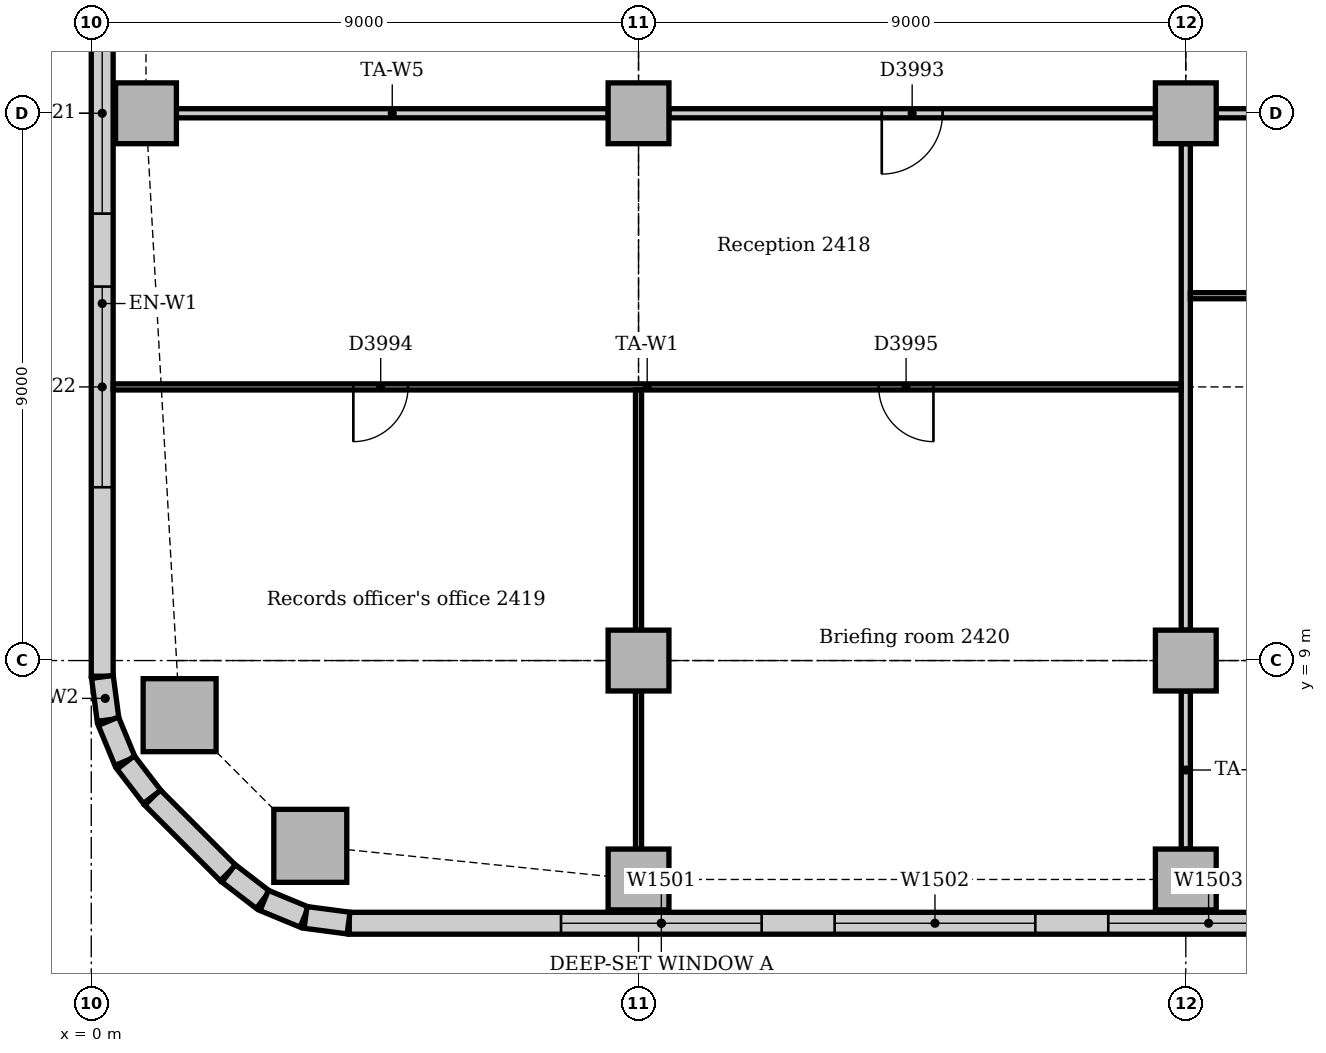
"""IFC4 building model, lengths in metres.
Left out: names, types, materials, properties, quantities, classifications, styles, units other than length and angle.
Written with IfcOpenShell. Run it as: python <this file> out.ifc"""

import sys

from ifc_helpers import new_model, si_unit, direction, frame, frame_2d, origin, origin_2d, place, context, subcontext, project, spatial, rectangle, extrude, element, fill, save


model = new_model("IFC4")
c1 = context("Model", 3, precision=1e-05, world=origin(), true_north=direction((0.0, 1.0)))
c2 = subcontext(c1, "Body", "Model", "MODEL_VIEW")
j1 = project(units=[si_unit("LENGTHUNIT", "METRE"), si_unit("PLANEANGLEUNIT", "RADIAN")], contexts=[c1])
p1 = place(None, origin())
s1 = spatial("IfcSite", under=j1, at=p1, CompositionType="ELEMENT")
p2 = place(p1, origin())
s2 = spatial("IfcBuilding", under=s1, at=p2, CompositionType="ELEMENT")
p3 = place(p2, frame((0.0, 0.0, 104.0)))
s3 = spatial("IfcBuildingStorey", under=s2, at=p3, CompositionType="ELEMENT", Elevation=104.0)
for number, where, z_axis, x_axis in (
    (1, (3.602, 5.953, 0.0), (0.0, 0.0, 1.0), (1.0, 0.0, 0.0)),
    (2, (1.453, 8.102, 0.0), (0.0, 0.0, 1.0), (1.0, 0.0, 0.0)),
):
    element("IfcColumn", number, at=place(p3, frame(where, z_axis=z_axis, x_axis=x_axis)), inside=s3, PredefinedType="COLUMN", context=c2, shape_type="SweptSolid", body=[
        extrude(rectangle(XDim=1.2, YDim=1.2, at=origin_2d()), origin(), (0.0, 0.0, 1.0), 3.85),
    ])
for number, where, z_axis, x_axis in (
    (3, (9.0, 5.4, 0.0), (0.0, 0.0, 1.0), (1.0, 0.0, 0.0)),
    (4, (18.0, 5.4, 0.0), (0.0, 0.0, 1.0), (1.0, 0.0, 0.0)),
    (5, (0.9, 18.0, 0.0), (0.0, 0.0, 1.0), (1.0, 0.0, 0.0)),
    (6, (9.0, 9.0, 0.0), (0.0, 0.0, 1.0), (1.0, 0.0, 0.0)),
    (7, (9.0, 18.0, 0.0), (0.0, 0.0, 1.0), (1.0, 0.0, 0.0)),
    (8, (18.0, 9.0, 0.0), (0.0, 0.0, 1.0), (1.0, 0.0, 0.0)),
    (9, (18.0, 18.0, 0.0), (0.0, 0.0, 1.0), (1.0, 0.0, 0.0)),
):
    element("IfcColumn", number, at=place(p3, frame(where, z_axis=z_axis, x_axis=x_axis)), inside=s3, PredefinedType="COLUMN", context=c2, shape_type="SweptSolid", body=[
        extrude(rectangle(XDim=1.0, YDim=1.0, at=origin_2d()), origin(), (0.0, 0.0, 1.0), 3.85),
    ])
p4 = place(p3, frame((4.243, 4.68, 0.0), z_axis=(0.0, 0.0, 1.0), x_axis=(1.0, 0.0, 0.0)))
e10 = element("IfcWall", 10, at=p4, inside=s3, PredefinedType="STANDARD", context=c2, shape_type="SweptSolid", body=[
    extrude(rectangle(XDim=37.265, YDim=0.36, at=frame_2d((18.632, 0.0))), origin(), (0.0, 0.0, 1.0), 3.85),
])
p5 = place(p4, frame((3.482, 0.0, 0.9)))
e11 = element("IfcOpeningElement", 11, at=p5, cuts=e10, PredefinedType="OPENING", context=c2, shape_type="SweptSolid", body=[
    extrude(rectangle(XDim=3.3, YDim=1.6, at=frame_2d((1.65, 0.8))), frame((0.0, 0.19, 0.0), z_axis=(0.0, -1.0, 0.0), x_axis=(1.0, 0.0, 0.0)), (0.0, 0.0, 1.0), 0.38),
])
p6 = place(p4, frame((7.982, 0.0, 0.9)))
e12 = element("IfcOpeningElement", 12, at=p6, cuts=e10, PredefinedType="OPENING", context=c2, shape_type="SweptSolid", body=[
    extrude(rectangle(XDim=3.3, YDim=1.6, at=frame_2d((1.65, 0.8))), frame((0.0, 0.19, 0.0), z_axis=(0.0, -1.0, 0.0), x_axis=(1.0, 0.0, 0.0)), (0.0, 0.0, 1.0), 0.38),
])
p7 = place(p4, frame((12.482, 0.0, 0.9)))
e13 = element("IfcOpeningElement", 13, at=p7, cuts=e10, PredefinedType="OPENING", context=c2, shape_type="SweptSolid", body=[
    extrude(rectangle(XDim=3.3, YDim=1.6, at=frame_2d((1.65, 0.8))), frame((0.0, 0.19, 0.0), z_axis=(0.0, -1.0, 0.0), x_axis=(1.0, 0.0, 0.0)), (0.0, 0.0, 1.0), 0.38),
])
p8 = place(p4, frame((16.982, 0.0, 0.9)))
e14 = element("IfcOpeningElement", 14, at=p8, cuts=e10, PredefinedType="OPENING", context=c2, shape_type="SweptSolid", body=[
    extrude(rectangle(XDim=3.3, YDim=1.6, at=frame_2d((1.65, 0.8))), frame((0.0, 0.19, 0.0), z_axis=(0.0, -1.0, 0.0), x_axis=(1.0, 0.0, 0.0)), (0.0, 0.0, 1.0), 0.38),
])
p9 = place(p4, frame((21.482, 0.0, 0.9)))
e15 = element("IfcOpeningElement", 15, at=p9, cuts=e10, PredefinedType="OPENING", context=c2, shape_type="SweptSolid", body=[
    extrude(rectangle(XDim=3.3, YDim=1.6, at=frame_2d((1.65, 0.8))), frame((0.0, 0.19, 0.0), z_axis=(0.0, -1.0, 0.0), x_axis=(1.0, 0.0, 0.0)), (0.0, 0.0, 1.0), 0.38),
])
p10 = place(p4, frame((27.482, 0.0, 0.9)))
e16 = element("IfcOpeningElement", 16, at=p10, cuts=e10, PredefinedType="OPENING", context=c2, shape_type="SweptSolid", body=[
    extrude(rectangle(XDim=1.8, YDim=1.6, at=frame_2d((0.9, 0.8))), frame((0.0, 0.19, 0.0), z_axis=(0.0, -1.0, 0.0), x_axis=(1.0, 0.0, 0.0)), (0.0, 0.0, 1.0), 0.38),
])
p11 = place(p4, frame((30.482, 0.0, 0.9)))
e17 = element("IfcOpeningElement", 17, at=p11, cuts=e10, PredefinedType="OPENING", context=c2, shape_type="SweptSolid", body=[
    extrude(rectangle(XDim=3.3, YDim=1.6, at=frame_2d((1.65, 0.8))), frame((0.0, 0.19, 0.0), z_axis=(0.0, -1.0, 0.0), x_axis=(1.0, 0.0, 0.0)), (0.0, 0.0, 1.0), 0.38),
])
p12 = place(p3, frame((0.18, 21.0, 0.0), z_axis=(0.0, 0.0, 1.0), x_axis=(0.0, -1.0, 0.0)))
e18 = element("IfcWall", 18, at=p12, inside=s3, PredefinedType="STANDARD", context=c2, shape_type="SweptSolid", body=[
    extrude(rectangle(XDim=12.257, YDim=0.36, at=frame_2d((6.129, 0.0))), origin(), (0.0, 0.0, 1.0), 3.85),
])
p13 = place(p12, frame((1.35, 0.0, 0.9)))
e19 = element("IfcOpeningElement", 19, at=p13, cuts=e18, PredefinedType="OPENING", context=c2, shape_type="SweptSolid", body=[
    extrude(rectangle(XDim=3.3, YDim=1.6, at=frame_2d((1.65, 0.8))), frame((0.0, 0.19, 0.0), z_axis=(0.0, -1.0, 0.0), x_axis=(1.0, 0.0, 0.0)), (0.0, 0.0, 1.0), 0.38),
])
p14 = place(p12, frame((5.85, 0.0, 0.9)))
e20 = element("IfcOpeningElement", 20, at=p14, cuts=e18, PredefinedType="OPENING", context=c2, shape_type="SweptSolid", body=[
    extrude(rectangle(XDim=3.3, YDim=1.6, at=frame_2d((1.65, 0.8))), frame((0.0, 0.19, 0.0), z_axis=(0.0, -1.0, 0.0), x_axis=(1.0, 0.0, 0.0)), (0.0, 0.0, 1.0), 0.38),
])
p15 = place(p3, frame((1.006, 6.749, 0.0), z_axis=(0.0, 0.0, 1.0), x_axis=(0.707106781187, -0.707106781187, 0.0)))
e21 = element("IfcWall", 21, at=p15, inside=s3, PredefinedType="STANDARD", context=c2, shape_type="SweptSolid", body=[
    extrude(rectangle(XDim=1.757, YDim=0.36, at=frame_2d((0.879, 0.0))), origin(), (0.0, 0.0, 1.0), 3.85),
])
for number, where, z_axis, x_axis in (
    (22, (0.183, 8.731, 0.0), (0.0, 0.0, 1.0), (0.131, -0.991, 0.0)),
    (23, (0.282, 8.003, 0.0), (0.0, 0.0, 1.0), (0.383, -0.924, 0.0)),
):
    element("IfcWall", number, at=place(p3, frame(where, z_axis=z_axis, x_axis=x_axis)), inside=s3, PredefinedType="STANDARD", context=c2, shape_type="SweptSolid", body=[
        extrude(rectangle(XDim=0.713, YDim=0.36, at=frame_2d((0.356, 0.0))), origin(), (0.0, 0.0, 1.0), 3.85),
    ])
for number, where, z_axis, x_axis in (
    (24, (0.566, 7.324, 0.0), (0.0, 0.0, 1.0), (0.609, -0.793, 0.0)),
    (25, (2.259, 5.5, 0.0), (0.0, 0.0, 1.0), (0.793, -0.609, 0.0)),
):
    element("IfcWall", number, at=place(p3, frame(where, z_axis=z_axis, x_axis=x_axis)), inside=s3, PredefinedType="STANDARD", context=c2, shape_type="SweptSolid", body=[
        extrude(rectangle(XDim=0.713, YDim=0.36, at=frame_2d((0.357, 0.0))), origin(), (0.0, 0.0, 1.0), 3.85),
    ])
for number, where, z_axis, x_axis in (
    (26, (2.844, 5.055, 0.0), (0.0, 0.0, 1.0), (0.924, -0.383, 0.0)),
    (27, (3.524, 4.776, 0.0), (0.0, 0.0, 1.0), (0.991, -0.131, 0.0)),
):
    element("IfcWall", number, at=place(p3, frame(where, z_axis=z_axis, x_axis=x_axis)), inside=s3, PredefinedType="STANDARD", context=c2, shape_type="SweptSolid", body=[
        extrude(rectangle(XDim=0.713, YDim=0.36, at=frame_2d((0.356, 0.0))), origin(), (0.0, 0.0, 1.0), 3.85),
    ])
p16 = place(p3, frame((18.5, 18.0, 0.0), z_axis=(0.0, 0.0, 1.0), x_axis=(1.0, 0.0, 0.0)))
e28 = element("IfcWall", 28, at=p16, inside=s3, PredefinedType="PARTITIONING", context=c2, shape_type="SweptSolid", body=[
    extrude(rectangle(XDim=8.0, YDim=0.15, at=frame_2d((4.0, 0.0))), origin(), (0.0, 0.0, 1.0), 3.158),
])
p17 = place(p16, frame((3.5, 0.0, 0.0)))
e29 = element("IfcOpeningElement", 29, at=p17, cuts=e28, PredefinedType="OPENING", context=c2, shape_type="SweptSolid", body=[
    extrude(rectangle(XDim=1.0, YDim=2.1, at=frame_2d((0.5, 1.05))), frame((0.0, 0.085, 0.0), z_axis=(0.0, -1.0, 0.0), x_axis=(1.0, 0.0, 0.0)), (0.0, 0.0, 1.0), 0.17),
])
p18 = place(p3, frame((9.5, 18.0, 0.0), z_axis=(0.0, 0.0, 1.0), x_axis=(1.0, 0.0, 0.0)))
e30 = element("IfcWall", 30, at=p18, inside=s3, PredefinedType="PARTITIONING", context=c2, shape_type="SweptSolid", body=[
    extrude(rectangle(XDim=8.0, YDim=0.15, at=frame_2d((4.0, 0.0))), origin(), (0.0, 0.0, 1.0), 3.158),
])
p19 = place(p18, frame((3.5, 0.0, 0.0)))
e31 = element("IfcOpeningElement", 31, at=p19, cuts=e30, PredefinedType="OPENING", context=c2, shape_type="SweptSolid", body=[
    extrude(rectangle(XDim=1.0, YDim=2.1, at=frame_2d((0.5, 1.05))), frame((0.0, 0.085, 0.0), z_axis=(0.0, -1.0, 0.0), x_axis=(1.0, 0.0, 0.0)), (0.0, 0.0, 1.0), 0.17),
])
p20 = place(p3, frame((1.4, 18.0, 0.0), z_axis=(0.0, 0.0, 1.0), x_axis=(1.0, 0.0, 0.0)))
e32 = element("IfcWall", 32, at=p20, inside=s3, PredefinedType="PARTITIONING", context=c2, shape_type="SweptSolid", body=[
    extrude(rectangle(XDim=7.1, YDim=0.15, at=frame_2d((3.55, 0.0))), origin(), (0.0, 0.0, 1.0), 3.158),
])
p21 = place(p3, frame((18.0, 5.9, 0.0), z_axis=(0.0, 0.0, 1.0), x_axis=(0.0, 1.0, 0.0)))
e33 = element("IfcWall", 33, at=p21, inside=s3, PredefinedType="PARTITIONING", context=c2, shape_type="SweptSolid", body=[
    extrude(rectangle(XDim=2.6, YDim=0.15, at=frame_2d((1.3, 0.0))), origin(), (0.0, 0.0, 1.0), 3.652),
])
p22 = place(p3, frame((18.0, 9.5, 0.0), z_axis=(0.0, 0.0, 1.0), x_axis=(0.0, 1.0, 0.0)))
e34 = element("IfcWall", 34, at=p22, inside=s3, PredefinedType="PARTITIONING", context=c2, shape_type="SweptSolid", body=[
    extrude(rectangle(XDim=8.0, YDim=0.15, at=frame_2d((4.0, 0.0))), origin(), (0.0, 0.0, 1.0), 3.256),
])
p23 = place(p3, frame((0.36, 13.5, 0.0), z_axis=(0.0, 0.0, 1.0), x_axis=(1.0, 0.0, 0.0)))
e35 = element("IfcWall", 35, at=p23, inside=s3, PredefinedType="PARTITIONING", context=c2, shape_type="SweptSolid", body=[
    extrude(rectangle(XDim=17.565, YDim=0.1, at=frame_2d((8.783, 0.0))), origin(), (0.0, 0.0, 1.0), 3.354),
])
p24 = place(p23, frame((3.95, 0.0, 0.0)))
e36 = element("IfcOpeningElement", 36, at=p24, cuts=e35, PredefinedType="OPENING", context=c2, shape_type="SweptSolid", body=[
    extrude(rectangle(XDim=0.9, YDim=2.1, at=frame_2d((0.45, 1.05))), frame((0.0, 0.06, 0.0), z_axis=(0.0, -1.0, 0.0), x_axis=(1.0, 0.0, 0.0)), (0.0, 0.0, 1.0), 0.12),
])
p25 = place(p23, frame((12.59, 0.0, 0.0)))
e37 = element("IfcOpeningElement", 37, at=p25, cuts=e35, PredefinedType="OPENING", context=c2, shape_type="SweptSolid", body=[
    extrude(rectangle(XDim=0.9, YDim=2.1, at=frame_2d((0.45, 1.05))), frame((0.0, 0.06, 0.0), z_axis=(0.0, -1.0, 0.0), x_axis=(1.0, 0.0, 0.0)), (0.0, 0.0, 1.0), 0.12),
])
p26 = place(p3, frame((18.075, 15.0, 0.0), z_axis=(0.0, 0.0, 1.0), x_axis=(1.0, 0.0, 0.0)))
e38 = element("IfcWall", 38, at=p26, inside=s3, PredefinedType="PARTITIONING", context=c2, shape_type="SweptSolid", body=[
    extrude(rectangle(XDim=13.35, YDim=0.1, at=frame_2d((6.675, 0.0))), origin(), (0.0, 0.0, 1.0), 3.85),
])
p27 = place(p26, frame((6.2, 0.0, 0.0)))
e39 = element("IfcOpeningElement", 39, at=p27, cuts=e38, PredefinedType="OPENING", context=c2, shape_type="SweptSolid", body=[
    extrude(rectangle(XDim=0.9, YDim=2.1, at=frame_2d((0.45, 1.05))), frame((0.0, 0.06, 0.0), z_axis=(0.0, -1.0, 0.0), x_axis=(1.0, 0.0, 0.0)), (0.0, 0.0, 1.0), 0.12),
])
p28 = place(p3, frame((9.0, 5.9, 0.0), z_axis=(0.0, 0.0, 1.0), x_axis=(0.0, 1.0, 0.0)))
e40 = element("IfcWall", 40, at=p28, inside=s3, PredefinedType="PARTITIONING", context=c2, shape_type="SweptSolid", body=[
    extrude(rectangle(XDim=2.6, YDim=0.1, at=frame_2d((1.3, 0.0))), origin(), (0.0, 0.0, 1.0), 3.652),
])
p29 = place(p3, frame((9.0, 9.5, 0.0), z_axis=(0.0, 0.0, 1.0), x_axis=(0.0, 1.0, 0.0)))
e41 = element("IfcWall", 41, at=p29, inside=s3, PredefinedType="PARTITIONING", context=c2, shape_type="SweptSolid", body=[
    extrude(rectangle(XDim=3.95, YDim=0.1, at=frame_2d((1.975, 0.0))), origin(), (0.0, 0.0, 1.0), 3.256),
])
p30 = place(p5, origin())
e42 = element("IfcWindow", 42, at=p30, inside=s3, PartitioningType="SINGLE_PANEL", PredefinedType="WINDOW", context=c2, shape_type="SweptSolid", body=[
    extrude(rectangle(XDim=3.3, YDim=1.6, at=frame_2d((1.65, 0.8))), frame((0.0, 0.13, 0.0), z_axis=(0.0, -1.0, 0.0), x_axis=(1.0, 0.0, 0.0)), (0.0, 0.0, 1.0), 0.06),
])
fill(e11, e42)
p31 = place(p6, origin())
e43 = element("IfcWindow", 43, at=p31, inside=s3, PartitioningType="SINGLE_PANEL", PredefinedType="WINDOW", context=c2, shape_type="SweptSolid", body=[
    extrude(rectangle(XDim=3.3, YDim=1.6, at=frame_2d((1.65, 0.8))), frame((0.0, 0.13, 0.0), z_axis=(0.0, -1.0, 0.0), x_axis=(1.0, 0.0, 0.0)), (0.0, 0.0, 1.0), 0.06),
])
fill(e12, e43)
p32 = place(p7, origin())
e44 = element("IfcWindow", 44, at=p32, inside=s3, PartitioningType="SINGLE_PANEL", PredefinedType="WINDOW", context=c2, shape_type="SweptSolid", body=[
    extrude(rectangle(XDim=3.3, YDim=1.6, at=frame_2d((1.65, 0.8))), frame((0.0, 0.13, 0.0), z_axis=(0.0, -1.0, 0.0), x_axis=(1.0, 0.0, 0.0)), (0.0, 0.0, 1.0), 0.06),
])
fill(e13, e44)
p33 = place(p13, origin())
e45 = element("IfcWindow", 45, at=p33, inside=s3, PartitioningType="SINGLE_PANEL", PredefinedType="WINDOW", context=c2, shape_type="SweptSolid", body=[
    extrude(rectangle(XDim=3.3, YDim=1.6, at=frame_2d((1.65, 0.8))), frame((0.0, 0.13, 0.0), z_axis=(0.0, -1.0, 0.0), x_axis=(1.0, 0.0, 0.0)), (0.0, 0.0, 1.0), 0.06),
])
fill(e19, e45)
p34 = place(p14, origin())
e46 = element("IfcWindow", 46, at=p34, inside=s3, PartitioningType="SINGLE_PANEL", PredefinedType="WINDOW", context=c2, shape_type="SweptSolid", body=[
    extrude(rectangle(XDim=3.3, YDim=1.6, at=frame_2d((1.65, 0.8))), frame((0.0, 0.13, 0.0), z_axis=(0.0, -1.0, 0.0), x_axis=(1.0, 0.0, 0.0)), (0.0, 0.0, 1.0), 0.06),
])
fill(e20, e46)
p35 = place(p19, frame((1.0, 0.0, 0.0), z_axis=(0.0, 0.0, 1.0), x_axis=(-1.0, 0.0, 0.0)))
e47 = element("IfcDoor", 47, at=p35, inside=s3, OperationType="SINGLE_SWING_RIGHT", PredefinedType="DOOR", context=c2, shape_type="SweptSolid", body=[
    extrude(rectangle(XDim=1.0, YDim=2.1, at=frame_2d((0.5, 1.05))), frame((0.0, 0.025, 0.0), z_axis=(0.0, -1.0, 0.0), x_axis=(1.0, 0.0, 0.0)), (0.0, 0.0, 1.0), 0.05),
])
fill(e31, e47)
p36 = place(p24, frame((0.9, 0.0, 0.0), z_axis=(0.0, 0.0, 1.0), x_axis=(-1.0, 0.0, 0.0)))
e48 = element("IfcDoor", 48, at=p36, inside=s3, OperationType="SINGLE_SWING_RIGHT", PredefinedType="DOOR", context=c2, shape_type="SweptSolid", body=[
    extrude(rectangle(XDim=0.9, YDim=2.1, at=frame_2d((0.45, 1.05))), frame((0.0, 0.025, 0.0), z_axis=(0.0, -1.0, 0.0), x_axis=(1.0, 0.0, 0.0)), (0.0, 0.0, 1.0), 0.05),
])
fill(e36, e48)
p37 = place(p25, frame((0.9, 0.0, 0.0), z_axis=(0.0, 0.0, 1.0), x_axis=(-1.0, 0.0, 0.0)))
e49 = element("IfcDoor", 49, at=p37, inside=s3, OperationType="SINGLE_SWING_LEFT", PredefinedType="DOOR", context=c2, shape_type="SweptSolid", body=[
    extrude(rectangle(XDim=0.9, YDim=2.1, at=frame_2d((0.45, 1.05))), frame((0.0, 0.025, 0.0), z_axis=(0.0, -1.0, 0.0), x_axis=(1.0, 0.0, 0.0)), (0.0, 0.0, 1.0), 0.05),
])
fill(e37, e49)
save(model, sys.argv[1])
